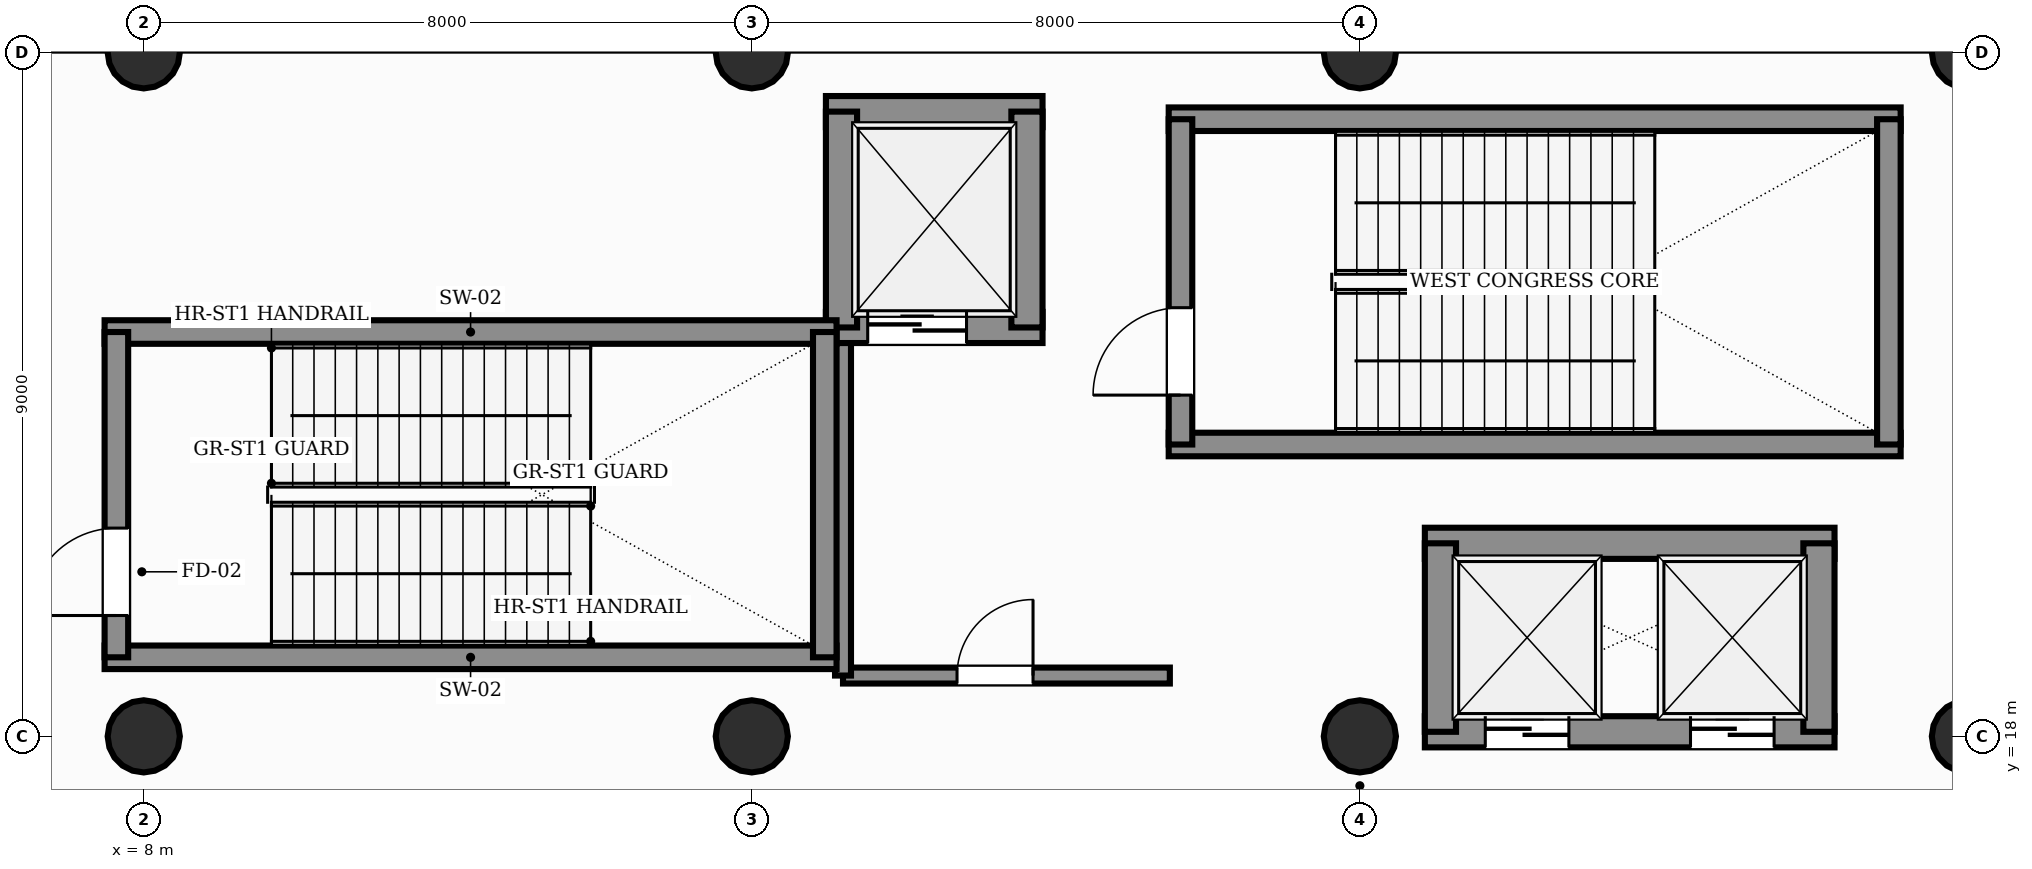
"""IFC4 building model, lengths in metres.
Left out: names, types, materials, properties, quantities, classifications, styles, units other than length and angle.
Written with IfcOpenShell. Run it as: python <this file> out.ifc"""

import sys

from ifc_helpers import new_model, si_unit, direction, frame, frame_2d, origin, origin_2d, place, context, subcontext, project, spatial, rectangle, circle, extrude, element, fill, save


model = new_model("IFC4")
c1 = context("Model", 3, precision=1e-05, world=origin(), true_north=direction((0.0, 1.0)))
c2 = subcontext(c1, "Body", "Model", "MODEL_VIEW")
j1 = project(units=[si_unit("LENGTHUNIT", "METRE"), si_unit("PLANEANGLEUNIT", "RADIAN")], contexts=[c1])
p1 = place(None, origin())
s1 = spatial("IfcSite", under=j1, at=p1, CompositionType="ELEMENT")
p2 = place(p1, origin())
s2 = spatial("IfcBuilding", under=s1, at=p2, CompositionType="ELEMENT")
p3 = place(p2, origin())
s3 = spatial("IfcBuildingStorey", under=s2, at=p3, CompositionType="ELEMENT", Elevation=0.0)
for number, where, z_axis, x_axis in (
    (1, (8.0, 18.0, 0.0), (0.0, 0.0, 1.0), (1.0, 0.0, 0.0)),
    (2, (8.0, 27.0, 0.0), (0.0, 0.0, 1.0), (1.0, 0.0, 0.0)),
    (3, (16.0, 18.0, 0.0), (0.0, 0.0, 1.0), (1.0, 0.0, 0.0)),
    (4, (16.0, 27.0, 0.0), (0.0, 0.0, 1.0), (1.0, 0.0, 0.0)),
    (5, (24.0, 18.0, 0.0), (0.0, 0.0, 1.0), (1.0, 0.0, 0.0)),
    (6, (24.0, 27.0, 0.0), (0.0, 0.0, 1.0), (1.0, 0.0, 0.0)),
    (7, (32.0, 18.0, 0.0), (0.0, 0.0, 1.0), (1.0, 0.0, 0.0)),
    (8, (32.0, 27.0, 0.0), (0.0, 0.0, 1.0), (1.0, 0.0, 0.0)),
):
    element("IfcColumn", number, at=place(p3, frame(where, z_axis=z_axis, x_axis=x_axis)), inside=s3, PredefinedType="COLUMN", context=c2, shape_type="SweptSolid", body=[
        extrude(circle(Radius=0.475, at=origin_2d()), origin(), (0.0, 0.0, 1.0), 6.0),
    ])
for number, where, z_axis, x_axis in (
    (9, (21.485, 21.84, 0.0), (0.0, 0.0, 1.0), (1.0, 0.0, 0.0)),
    (10, (21.485, 26.12, 0.0), (0.0, 0.0, 1.0), (1.0, 0.0, 0.0)),
):
    element("IfcWall", number, at=place(p3, frame(where, z_axis=z_axis, x_axis=x_axis)), inside=s3, PredefinedType="SHEAR", context=c2, shape_type="SweptSolid", body=[
        extrude(rectangle(XDim=9.63, YDim=0.31, at=frame_2d((4.815, 0.0))), origin(), (0.0, 0.0, 1.0), 6.0),
    ])
p4 = place(p3, frame((21.64, 21.84, 0.0), z_axis=(0.0, 0.0, 1.0), x_axis=(0.0, 1.0, 0.0)))
e11 = element("IfcWall", 11, at=p4, inside=s3, PredefinedType="SHEAR", context=c2, shape_type="SweptSolid", body=[
    extrude(rectangle(XDim=4.28, YDim=0.31, at=frame_2d((2.14, 0.0))), origin(), (0.0, 0.0, 1.0), 6.0),
])
p5 = place(p4, frame((0.65, 0.0, 0.0)))
e12 = element("IfcOpeningElement", 12, at=p5, cuts=e11, PredefinedType="OPENING", context=c2, shape_type="SweptSolid", body=[
    extrude(rectangle(XDim=1.15, YDim=2.2, at=frame_2d((0.575, 1.1))), frame((0.0, 0.165, 0.0), z_axis=(0.0, -1.0, 0.0), x_axis=(1.0, 0.0, 0.0)), (0.0, 0.0, 1.0), 0.33),
])
p6 = place(p3, frame((30.96, 21.84, 0.0), z_axis=(0.0, 0.0, 1.0), x_axis=(0.0, 1.0, 0.0)))
e13 = element("IfcWall", 13, at=p6, inside=s3, PredefinedType="SHEAR", context=c2, shape_type="SweptSolid", body=[
    extrude(rectangle(XDim=4.28, YDim=0.31, at=frame_2d((2.14, 0.0))), origin(), (0.0, 0.0, 1.0), 6.0),
])
p7 = place(p3, frame((17.2, 18.8, 0.0), z_axis=(0.0, 0.0, 1.0), x_axis=(1.0, 0.0, 0.0)))
e14 = element("IfcWall", 14, at=p7, inside=s3, PredefinedType="PARTITIONING", context=c2, shape_type="SweptSolid", body=[
    extrude(rectangle(XDim=4.3, YDim=0.21, at=frame_2d((2.15, 0.0))), origin(), (0.0, 0.0, 1.0), 4.65),
])
p8 = place(p7, frame((1.5, 0.0, 0.0)))
e15 = element("IfcOpeningElement", 15, at=p8, cuts=e14, PredefinedType="OPENING", context=c2, shape_type="SweptSolid", body=[
    extrude(rectangle(XDim=1.0, YDim=2.15, at=frame_2d((0.5, 1.075))), frame((0.0, 0.115, 0.0), z_axis=(0.0, -1.0, 0.0), x_axis=(1.0, 0.0, 0.0)), (0.0, 0.0, 1.0), 0.23),
])
p9 = place(p3, frame((17.2, 18.8, 0.0), z_axis=(0.0, 0.0, 1.0), x_axis=(0.0, 1.0, 0.0)))
e16 = element("IfcWall", 16, at=p9, inside=s3, PredefinedType="PARTITIONING", context=c2, shape_type="SweptSolid", body=[
    extrude(rectangle(XDim=4.6, YDim=0.21, at=frame_2d((2.3, 0.0))), origin(), (0.0, 0.0, 1.0), 4.65),
])
p10 = place(p3, frame((16.975, 23.38, 0.0), z_axis=(0.0, 0.0, 1.0), x_axis=(1.0, 0.0, 0.0)))
e17 = element("IfcWall", 17, at=p10, inside=s3, PredefinedType="SHEAR", context=c2, shape_type="SweptSolid", body=[
    extrude(rectangle(XDim=2.85, YDim=0.41, at=frame_2d((1.425, 0.0))), origin(), (0.0, 0.0, 1.0), 6.0),
])
p11 = place(p10, frame((0.55, 0.0, 0.0)))
e18 = element("IfcOpeningElement", 18, at=p11, cuts=e17, PredefinedType="OPENING", context=c2, shape_type="SweptSolid", body=[
    extrude(rectangle(XDim=1.3, YDim=2.25, at=frame_2d((0.65, 1.125))), frame((0.0, 0.215, 0.0), z_axis=(0.0, -1.0, 0.0), x_axis=(1.0, 0.0, 0.0)), (0.0, 0.0, 1.0), 0.43),
])
p12 = place(p3, frame((16.975, 26.22, 0.0), z_axis=(0.0, 0.0, 1.0), x_axis=(1.0, 0.0, 0.0)))
e19 = element("IfcWall", 19, at=p12, inside=s3, PredefinedType="SHEAR", context=c2, shape_type="SweptSolid", body=[
    extrude(rectangle(XDim=2.85, YDim=0.41, at=frame_2d((1.425, 0.0))), origin(), (0.0, 0.0, 1.0), 6.0),
])
for number, where, z_axis, x_axis in (
    (20, (17.18, 23.38, 0.0), (0.0, 0.0, 1.0), (0.0, 1.0, 0.0)),
    (21, (19.62, 23.38, 0.0), (0.0, 0.0, 1.0), (0.0, 1.0, 0.0)),
):
    element("IfcWall", number, at=place(p3, frame(where, z_axis=z_axis, x_axis=x_axis)), inside=s3, PredefinedType="SHEAR", context=c2, shape_type="SweptSolid", body=[
        extrude(rectangle(XDim=2.84, YDim=0.41, at=frame_2d((1.42, 0.0))), origin(), (0.0, 0.0, 1.0), 6.0),
    ])
p13 = place(p3, frame((24.855, 18.06, 0.0), z_axis=(0.0, 0.0, 1.0), x_axis=(1.0, 0.0, 0.0)))
e22 = element("IfcWall", 22, at=p13, inside=s3, PredefinedType="SHEAR", context=c2, shape_type="SweptSolid", body=[
    extrude(rectangle(XDim=5.39, YDim=0.41, at=frame_2d((2.695, 0.0))), origin(), (0.0, 0.0, 1.0), 6.0),
])
p14 = place(p13, frame((0.795, 0.0, 0.0)))
e23 = element("IfcOpeningElement", 23, at=p14, cuts=e22, PredefinedType="OPENING", context=c2, shape_type="SweptSolid", body=[
    extrude(rectangle(XDim=1.1, YDim=2.2, at=frame_2d((0.55, 1.1))), frame((0.0, 0.215, 0.0), z_axis=(0.0, -1.0, 0.0), x_axis=(1.0, 0.0, 0.0)), (0.0, 0.0, 1.0), 0.43),
])
p15 = place(p13, frame((3.495, 0.0, 0.0)))
e24 = element("IfcOpeningElement", 24, at=p15, cuts=e22, PredefinedType="OPENING", context=c2, shape_type="SweptSolid", body=[
    extrude(rectangle(XDim=1.1, YDim=2.2, at=frame_2d((0.55, 1.1))), frame((0.0, 0.215, 0.0), z_axis=(0.0, -1.0, 0.0), x_axis=(1.0, 0.0, 0.0)), (0.0, 0.0, 1.0), 0.43),
])
p16 = place(p3, frame((24.855, 20.54, 0.0), z_axis=(0.0, 0.0, 1.0), x_axis=(1.0, 0.0, 0.0)))
e25 = element("IfcWall", 25, at=p16, inside=s3, PredefinedType="SHEAR", context=c2, shape_type="SweptSolid", body=[
    extrude(rectangle(XDim=5.39, YDim=0.41, at=frame_2d((2.695, 0.0))), origin(), (0.0, 0.0, 1.0), 6.0),
])
for number, where, z_axis, x_axis in (
    (26, (25.06, 18.06, 0.0), (0.0, 0.0, 1.0), (0.0, 1.0, 0.0)),
    (27, (30.04, 18.06, 0.0), (0.0, 0.0, 1.0), (0.0, 1.0, 0.0)),
):
    element("IfcWall", number, at=place(p3, frame(where, z_axis=z_axis, x_axis=x_axis)), inside=s3, PredefinedType="SHEAR", context=c2, shape_type="SweptSolid", body=[
        extrude(rectangle(XDim=2.48, YDim=0.41, at=frame_2d((1.24, 0.0))), origin(), (0.0, 0.0, 1.0), 6.0),
    ])
for number, where, z_axis, x_axis in (
    (28, (7.485, 19.04, 0.0), (0.0, 0.0, 1.0), (1.0, 0.0, 0.0)),
    (29, (7.485, 23.32, 0.0), (0.0, 0.0, 1.0), (1.0, 0.0, 0.0)),
):
    element("IfcWall", number, at=place(p3, frame(where, z_axis=z_axis, x_axis=x_axis)), inside=s3, PredefinedType="SHEAR", context=c2, shape_type="SweptSolid", body=[
        extrude(rectangle(XDim=9.63, YDim=0.31, at=frame_2d((4.815, 0.0))), origin(), (0.0, 0.0, 1.0), 6.0),
    ])
p17 = place(p3, frame((7.64, 19.04, 0.0), z_axis=(0.0, 0.0, 1.0), x_axis=(0.0, 1.0, 0.0)))
e30 = element("IfcWall", 30, at=p17, inside=s3, PredefinedType="SHEAR", context=c2, shape_type="SweptSolid", body=[
    extrude(rectangle(XDim=4.28, YDim=0.31, at=frame_2d((2.14, 0.0))), origin(), (0.0, 0.0, 1.0), 6.0),
])
p18 = place(p17, frame((0.55, 0.0, 0.0)))
e31 = element("IfcOpeningElement", 31, at=p18, cuts=e30, PredefinedType="OPENING", context=c2, shape_type="SweptSolid", body=[
    extrude(rectangle(XDim=1.15, YDim=2.2, at=frame_2d((0.575, 1.1))), frame((0.0, 0.165, 0.0), z_axis=(0.0, -1.0, 0.0), x_axis=(1.0, 0.0, 0.0)), (0.0, 0.0, 1.0), 0.33),
])
p19 = place(p3, frame((16.96, 19.04, 0.0), z_axis=(0.0, 0.0, 1.0), x_axis=(0.0, 1.0, 0.0)))
e32 = element("IfcWall", 32, at=p19, inside=s3, PredefinedType="SHEAR", context=c2, shape_type="SweptSolid", body=[
    extrude(rectangle(XDim=4.28, YDim=0.31, at=frame_2d((2.14, 0.0))), origin(), (0.0, 0.0, 1.0), 6.0),
])
p20 = place(p5, origin())
e33 = element("IfcDoor", 33, at=p20, inside=s3, OperationType="SINGLE_SWING_LEFT", PredefinedType="DOOR", context=c2, shape_type="SweptSolid", body=[
    extrude(rectangle(XDim=1.15, YDim=2.2, at=frame_2d((0.575, 1.1))), frame((0.0, 0.025, 0.0), z_axis=(0.0, -1.0, 0.0), x_axis=(1.0, 0.0, 0.0)), (0.0, 0.0, 1.0), 0.05),
])
fill(e12, e33)
p21 = place(p8, origin())
e34 = element("IfcDoor", 34, at=p21, inside=s3, OperationType="SINGLE_SWING_RIGHT", PredefinedType="DOOR", context=c2, shape_type="SweptSolid", body=[
    extrude(rectangle(XDim=1.0, YDim=2.15, at=frame_2d((0.5, 1.075))), frame((0.0, 0.025, 0.0), z_axis=(0.0, -1.0, 0.0), x_axis=(1.0, 0.0, 0.0)), (0.0, 0.0, 1.0), 0.05),
])
fill(e15, e34)
p22 = place(p11, origin())
e35 = element("IfcDoor", 35, at=p22, inside=s3, OperationType="DOUBLE_DOOR_SLIDING", PredefinedType="DOOR", context=c2, shape_type="SweptSolid", body=[
    extrude(rectangle(XDim=1.3, YDim=2.25, at=frame_2d((0.65, 1.125))), frame((0.0, 0.025, 0.0), z_axis=(0.0, -1.0, 0.0), x_axis=(1.0, 0.0, 0.0)), (0.0, 0.0, 1.0), 0.05),
])
fill(e18, e35)
p23 = place(p14, origin())
e36 = element("IfcDoor", 36, at=p23, inside=s3, OperationType="DOUBLE_DOOR_SLIDING", PredefinedType="DOOR", context=c2, shape_type="SweptSolid", body=[
    extrude(rectangle(XDim=1.1, YDim=2.2, at=frame_2d((0.55, 1.1))), frame((0.0, 0.025, 0.0), z_axis=(0.0, -1.0, 0.0), x_axis=(1.0, 0.0, 0.0)), (0.0, 0.0, 1.0), 0.05),
])
fill(e23, e36)
p24 = place(p15, origin())
e37 = element("IfcDoor", 37, at=p24, inside=s3, OperationType="DOUBLE_DOOR_SLIDING", PredefinedType="DOOR", context=c2, shape_type="SweptSolid", body=[
    extrude(rectangle(XDim=1.1, YDim=2.2, at=frame_2d((0.55, 1.1))), frame((0.0, 0.025, 0.0), z_axis=(0.0, -1.0, 0.0), x_axis=(1.0, 0.0, 0.0)), (0.0, 0.0, 1.0), 0.05),
])
fill(e24, e37)
p25 = place(p18, origin())
e38 = element("IfcDoor", 38, at=p25, inside=s3, OperationType="SINGLE_SWING_LEFT", PredefinedType="DOOR", context=c2, shape_type="SweptSolid", body=[
    extrude(rectangle(XDim=1.15, YDim=2.2, at=frame_2d((0.575, 1.1))), frame((0.0, 0.025, 0.0), z_axis=(0.0, -1.0, 0.0), x_axis=(1.0, 0.0, 0.0)), (0.0, 0.0, 1.0), 0.05),
])
fill(e31, e38)
save(model, sys.argv[1])
